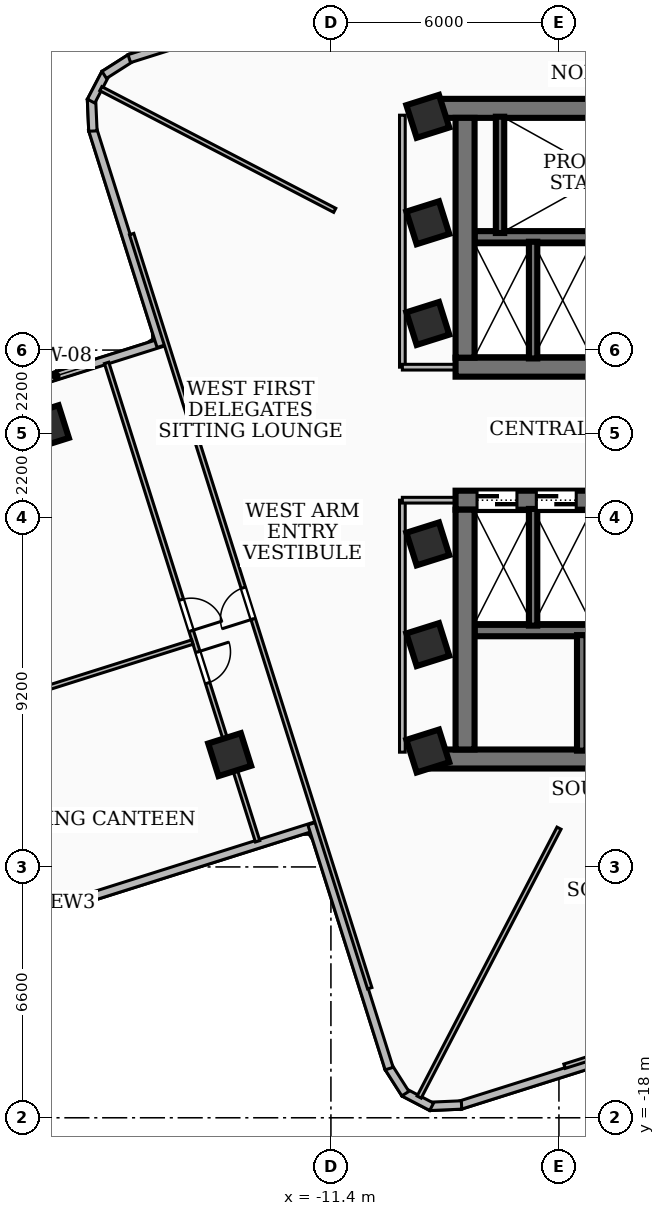
"""IFC4 building model, lengths in metres.
Left out: names, types, materials, properties, quantities, classifications, styles, units other than length and angle.
Written with IfcOpenShell. Run it as: python <this file> out.ifc"""

import sys

from ifc_helpers import new_model, si_unit, direction, frame, frame_2d, origin, origin_2d, place, context, subcontext, project, spatial, rectangle, extrude, element, fill, save


model = new_model("IFC4")
c1 = context("Model", 3, precision=1e-05, world=origin(), true_north=direction((0.0, 1.0)))
c2 = subcontext(c1, "Body", "Model", "MODEL_VIEW")
j1 = project(units=[si_unit("LENGTHUNIT", "METRE"), si_unit("PLANEANGLEUNIT", "RADIAN")], contexts=[c1])
p1 = place(None, origin())
s1 = spatial("IfcSite", under=j1, at=p1, CompositionType="ELEMENT")
p2 = place(p1, origin())
s2 = spatial("IfcBuilding", under=s1, at=p2, CompositionType="ELEMENT")
p3 = place(p2, frame((0.0, 0.0, 152.28)))
s3 = spatial("IfcBuildingStorey", under=s2, at=p3, CompositionType="ELEMENT", Elevation=152.28)
p4 = place(p3, frame((-8.78, 8.56, 0.0), z_axis=(0.0, 0.0, 1.0), x_axis=(1.0, 0.0, 0.0)))
e1 = element("IfcWall", 1, at=p4, inside=s3, PredefinedType="SHEAR", context=c2, shape_type="SweptSolid", body=[
    extrude(rectangle(XDim=17.56, YDim=0.5, at=frame_2d((8.78, 0.0))), origin(), (0.0, 0.0, 1.0), 3.34),
])
p5 = place(p3, frame((8.12, 1.75, 0.0), z_axis=(0.0, 0.0, 1.0), x_axis=(-1.0, 0.0, 0.0)))
e2 = element("IfcWall", 2, at=p5, inside=s3, PredefinedType="SHEAR", context=c2, shape_type="SweptSolid", body=[
    extrude(rectangle(XDim=16.24, YDim=0.5, at=frame_2d((8.12, 0.0))), origin(), (0.0, 0.0, 1.0), 3.34),
])
p6 = place(p5, frame((7.45, 0.0, 0.0)))
e3 = element("IfcOpeningElement", 3, at=p6, cuts=e2, PredefinedType="OPENING", context=c2, shape_type="SweptSolid", body=[
    extrude(rectangle(XDim=1.0, YDim=2.1, at=frame_2d((0.5, 1.05))), frame((0.0, 0.26, 0.0), z_axis=(0.0, -1.0, 0.0), x_axis=(1.0, 0.0, 0.0)), (0.0, 0.0, 1.0), 0.52),
])
p7 = place(p5, frame((3.85, 0.0, 0.0)))
e4 = element("IfcOpeningElement", 4, at=p7, cuts=e2, PredefinedType="OPENING", context=c2, shape_type="SweptSolid", body=[
    extrude(rectangle(XDim=0.9, YDim=2.06, at=frame_2d((0.45, 1.03))), frame((0.0, 0.26, 0.0), z_axis=(0.0, -1.0, 0.0), x_axis=(1.0, 0.0, 0.0)), (0.0, 0.0, 1.0), 0.52),
])
p8 = place(p5, frame((2.35, 0.0, 0.0)))
e5 = element("IfcOpeningElement", 5, at=p8, cuts=e2, PredefinedType="OPENING", context=c2, shape_type="SweptSolid", body=[
    extrude(rectangle(XDim=0.9, YDim=2.06, at=frame_2d((0.45, 1.03))), frame((0.0, 0.26, 0.0), z_axis=(0.0, -1.0, 0.0), x_axis=(1.0, 0.0, 0.0)), (0.0, 0.0, 1.0), 0.52),
])
p9 = place(p5, frame((0.8, 0.0, 0.0)))
e6 = element("IfcOpeningElement", 6, at=p9, cuts=e2, PredefinedType="OPENING", context=c2, shape_type="SweptSolid", body=[
    extrude(rectangle(XDim=0.9, YDim=2.06, at=frame_2d((0.45, 1.03))), frame((0.0, 0.26, 0.0), z_axis=(0.0, -1.0, 0.0), x_axis=(1.0, 0.0, 0.0)), (0.0, 0.0, 1.0), 0.52),
])
p10 = place(p3, frame((-7.87, 2.0, 0.0), z_axis=(0.0, 0.0, 1.0), x_axis=(0.0, 1.0, 0.0)))
e7 = element("IfcWall", 7, at=p10, inside=s3, PredefinedType="SHEAR", context=c2, shape_type="SweptSolid", body=[
    extrude(rectangle(XDim=6.31, YDim=0.5, at=frame_2d((3.155, 0.0))), origin(), (0.0, 0.0, 1.0), 3.34),
])
p11 = place(p3, frame((7.62, 5.18, 0.0), z_axis=(0.0, 0.0, 1.0), x_axis=(-1.0, 0.0, 0.0)))
e8 = element("IfcWall", 8, at=p11, inside=s3, PredefinedType="SOLIDWALL", context=c2, shape_type="SweptSolid", body=[
    extrude(rectangle(XDim=15.24, YDim=0.3, at=frame_2d((7.62, 0.0))), origin(), (0.0, 0.0, 1.0), 3.34),
])
p12 = place(p11, frame((5.77, 0.0, 0.0)))
e9 = element("IfcOpeningElement", 9, at=p12, cuts=e8, PredefinedType="OPENING", context=c2, shape_type="SweptSolid", body=[
    extrude(rectangle(XDim=1.1, YDim=2.15, at=frame_2d((0.55, 1.075))), frame((0.0, 0.16, 0.0), z_axis=(0.0, -1.0, 0.0), x_axis=(1.0, 0.0, 0.0)), (0.0, 0.0, 1.0), 0.32),
])
p13 = place(p11, frame((2.97, 0.0, 0.0)))
e10 = element("IfcOpeningElement", 10, at=p13, cuts=e8, PredefinedType="OPENING", context=c2, shape_type="SweptSolid", body=[
    extrude(rectangle(XDim=1.1, YDim=2.15, at=frame_2d((0.55, 1.075))), frame((0.0, 0.16, 0.0), z_axis=(0.0, -1.0, 0.0), x_axis=(1.0, 0.0, 0.0)), (0.0, 0.0, 1.0), 0.32),
])
p14 = place(p11, frame((7.97, 0.0, 0.0)))
e11 = element("IfcOpeningElement", 11, at=p14, cuts=e8, PredefinedType="OPENING", context=c2, shape_type="SweptSolid", body=[
    extrude(rectangle(XDim=1.0, YDim=2.1, at=frame_2d((0.5, 1.05))), frame((0.0, 0.16, 0.0), z_axis=(0.0, -1.0, 0.0), x_axis=(1.0, 0.0, 0.0)), (0.0, 0.0, 1.0), 0.32),
])
p15 = place(p3, frame((8.78, -8.56, 0.0), z_axis=(0.0, 0.0, 1.0), x_axis=(-1.0, 0.0, 0.0)))
e12 = element("IfcWall", 12, at=p15, inside=s3, PredefinedType="SHEAR", context=c2, shape_type="SweptSolid", body=[
    extrude(rectangle(XDim=17.56, YDim=0.5, at=frame_2d((8.78, 0.0))), origin(), (0.0, 0.0, 1.0), 3.34),
])
p16 = place(p3, frame((-8.12, -1.75, 0.0), z_axis=(0.0, 0.0, 1.0), x_axis=(1.0, 0.0, 0.0)))
e13 = element("IfcWall", 13, at=p16, inside=s3, PredefinedType="SHEAR", context=c2, shape_type="SweptSolid", body=[
    extrude(rectangle(XDim=16.24, YDim=0.5, at=frame_2d((8.12, 0.0))), origin(), (0.0, 0.0, 1.0), 3.34),
])
p17 = place(p16, frame((7.45, 0.0, 0.0)))
e14 = element("IfcOpeningElement", 14, at=p17, cuts=e13, PredefinedType="OPENING", context=c2, shape_type="SweptSolid", body=[
    extrude(rectangle(XDim=1.0, YDim=2.1, at=frame_2d((0.5, 1.05))), frame((0.0, 0.26, 0.0), z_axis=(0.0, -1.0, 0.0), x_axis=(1.0, 0.0, 0.0)), (0.0, 0.0, 1.0), 0.52),
])
p18 = place(p16, frame((12.65, 0.0, 0.0)))
e15 = element("IfcOpeningElement", 15, at=p18, cuts=e13, PredefinedType="OPENING", context=c2, shape_type="SweptSolid", body=[
    extrude(rectangle(XDim=0.9, YDim=2.06, at=frame_2d((0.45, 1.03))), frame((0.0, 0.26, 0.0), z_axis=(0.0, -1.0, 0.0), x_axis=(1.0, 0.0, 0.0)), (0.0, 0.0, 1.0), 0.52),
])
p19 = place(p16, frame((0.565, 0.0, 0.0)))
e16 = element("IfcOpeningElement", 16, at=p19, cuts=e13, PredefinedType="OPENING", context=c2, shape_type="SweptSolid", body=[
    extrude(rectangle(XDim=1.05, YDim=2.15, at=frame_2d((0.525, 1.075))), frame((0.0, 0.26, 0.0), z_axis=(0.0, -1.0, 0.0), x_axis=(1.0, 0.0, 0.0)), (0.0, 0.0, 1.0), 0.52),
])
p20 = place(p16, frame((2.125, 0.0, 0.0)))
e17 = element("IfcOpeningElement", 17, at=p20, cuts=e13, PredefinedType="OPENING", context=c2, shape_type="SweptSolid", body=[
    extrude(rectangle(XDim=1.05, YDim=2.15, at=frame_2d((0.525, 1.075))), frame((0.0, 0.26, 0.0), z_axis=(0.0, -1.0, 0.0), x_axis=(1.0, 0.0, 0.0)), (0.0, 0.0, 1.0), 0.52),
])
p21 = place(p16, frame((3.685, 0.0, 0.0)))
e18 = element("IfcOpeningElement", 18, at=p21, cuts=e13, PredefinedType="OPENING", context=c2, shape_type="SweptSolid", body=[
    extrude(rectangle(XDim=1.05, YDim=2.15, at=frame_2d((0.525, 1.075))), frame((0.0, 0.26, 0.0), z_axis=(0.0, -1.0, 0.0), x_axis=(1.0, 0.0, 0.0)), (0.0, 0.0, 1.0), 0.52),
])
p22 = place(p3, frame((-7.87, -8.31, 0.0), z_axis=(0.0, 0.0, 1.0), x_axis=(0.0, 1.0, 0.0)))
e19 = element("IfcWall", 19, at=p22, inside=s3, PredefinedType="SHEAR", context=c2, shape_type="SweptSolid", body=[
    extrude(rectangle(XDim=6.31, YDim=0.5, at=frame_2d((3.155, 0.0))), origin(), (0.0, 0.0, 1.0), 3.34),
])
p23 = place(p3, frame((-7.62, -5.18, 0.0), z_axis=(0.0, 0.0, 1.0), x_axis=(1.0, 0.0, 0.0)))
e20 = element("IfcWall", 20, at=p23, inside=s3, PredefinedType="SOLIDWALL", context=c2, shape_type="SweptSolid", body=[
    extrude(rectangle(XDim=15.24, YDim=0.3, at=frame_2d((7.62, 0.0))), origin(), (0.0, 0.0, 1.0), 3.34),
])
p24 = place(p23, frame((5.77, 0.0, 0.0)))
e21 = element("IfcOpeningElement", 21, at=p24, cuts=e20, PredefinedType="OPENING", context=c2, shape_type="SweptSolid", body=[
    extrude(rectangle(XDim=1.1, YDim=2.15, at=frame_2d((0.55, 1.075))), frame((0.0, 0.16, 0.0), z_axis=(0.0, -1.0, 0.0), x_axis=(1.0, 0.0, 0.0)), (0.0, 0.0, 1.0), 0.32),
])
p25 = place(p23, frame((7.97, 0.0, 0.0)))
e22 = element("IfcOpeningElement", 22, at=p25, cuts=e20, PredefinedType="OPENING", context=c2, shape_type="SweptSolid", body=[
    extrude(rectangle(XDim=1.0, YDim=2.1, at=frame_2d((0.5, 1.05))), frame((0.0, 0.16, 0.0), z_axis=(0.0, -1.0, 0.0), x_axis=(1.0, 0.0, 0.0)), (0.0, 0.0, 1.0), 0.32),
])
p26 = place(p3, frame((-6.95, 5.28, 0.0), z_axis=(0.0, 0.0, 1.0), x_axis=(0.0, 1.0, 0.0)))
e23 = element("IfcWall", 23, at=p26, inside=s3, PredefinedType="SOLIDWALL", context=c2, shape_type="SweptSolid", body=[
    extrude(rectangle(XDim=3.06, YDim=0.22, at=frame_2d((1.53, 0.0))), origin(), (0.0, 0.0, 1.0), 3.34),
])
p27 = place(p3, frame((-4.8, -8.34, 0.0), z_axis=(0.0, 0.0, 1.0), x_axis=(0.0, 1.0, 0.0)))
e24 = element("IfcWall", 24, at=p27, inside=s3, PredefinedType="SOLIDWALL", context=c2, shape_type="SweptSolid", body=[
    extrude(rectangle(XDim=3.04, YDim=0.25, at=frame_2d((1.52, 0.0))), origin(), (0.0, 0.0, 1.0), 3.34),
])
for number, where, z_axis, x_axis in (
    (25, (-6.08, 1.98, 0.0), (0.0, 0.0, 1.0), (0.0, 1.0, 0.0)),
    (26, (-6.08, -5.05, 0.0), (0.0, 0.0, 1.0), (0.0, 1.0, 0.0)),
):
    element("IfcWall", number, at=place(p3, frame(where, z_axis=z_axis, x_axis=x_axis)), inside=s3, PredefinedType="SOLIDWALL", context=c2, shape_type="SweptSolid", body=[
        extrude(rectangle(XDim=3.07, YDim=0.22, at=frame_2d((1.535, 0.0))), origin(), (0.0, 0.0, 1.0), 3.34),
    ])
for number, where, z_axis, x_axis in (
    (27, (-8.85, -5.55, 0.0), (0.0, 0.0, 1.0), (0.954, 0.301, 0.0)),
    (28, (-8.85, -2.9, 0.0), (0.0, 0.0, 1.0), (0.954, 0.301, 0.0)),
    (29, (-8.85, 2.9, 0.0), (0.0, 0.0, 1.0), (0.954, 0.301, 0.0)),
    (30, (-8.85, 5.55, 0.0), (0.0, 0.0, 1.0), (0.954, 0.301, 0.0)),
    (31, (-8.85, 8.35, 0.0), (0.0, 0.0, 1.0), (0.954, 0.301, 0.0)),
    (32, (-8.85, -8.35, 0.0), (0.0, 0.0, 1.0), (0.954, 0.301, 0.0)),
    (33, (-18.86, 0.183, 0.0), (0.0, 0.0, 1.0), (0.954, 0.301, 0.0)),
    (34, (-14.064, -8.445, 0.0), (0.0, 0.0, 1.0), (0.954, 0.301, 0.0)),
):
    element("IfcColumn", number, at=place(p3, frame(where, z_axis=z_axis, x_axis=x_axis)), inside=s3, PredefinedType="COLUMN", context=c2, shape_type="SweptSolid", body=[
        extrude(rectangle(XDim=0.9, YDim=0.9, at=origin_2d()), origin(), (0.0, 0.0, 1.0), 3.6),
    ])
p28 = place(p3, frame((-11.792, -10.319, 0.0), z_axis=(0.0, 0.0, 1.0), x_axis=(-0.953607060649, -0.301054104573, 0.0)))
e35 = element("IfcWall", 35, at=p28, inside=s3, PredefinedType="SOLIDWALL", context=c2, shape_type="SweptSolid", body=[
    extrude(rectangle(XDim=13.459, YDim=0.22, at=frame_2d((6.73, 0.0))), origin(), (0.0, 0.0, 1.0), 2.152),
])
p29 = place(p3, frame((-28.646, -1.64, 0.0), z_axis=(0.0, 0.0, 1.0), x_axis=(0.953626521982, 0.300992452685, 0.0)))
e36 = element("IfcWall", 36, at=p29, inside=s3, PredefinedType="SOLIDWALL", context=c2, shape_type="SweptSolid", body=[
    extrude(rectangle(XDim=13.458, YDim=0.22, at=frame_2d((6.729, 0.0))), origin(), (0.0, 0.0, 1.0), 3.34),
])
p30 = place(p29, frame((9.597, 0.0, 0.85)))
e37 = element("IfcOpeningElement", 37, at=p30, cuts=e36, PredefinedType="OPENING", context=c2, shape_type="SweptSolid", body=[
    extrude(rectangle(XDim=1.8, YDim=1.8, at=frame_2d((0.9, 0.9))), frame((0.0, 0.12, 0.0), z_axis=(0.0, -1.0, 0.0), x_axis=(1.0, 0.0, 0.0)), (0.0, 0.0, 1.0), 0.24),
])
p31 = place(p3, frame((-15.87, 2.301, 0.0), z_axis=(0.0, 0.0, 1.0), x_axis=(-0.300910882413, 0.953652264112, 0.0)))
e38 = element("IfcWall", 38, at=p31, inside=s3, PredefinedType="SOLIDWALL", context=c2, shape_type="SweptSolid", body=[
    extrude(rectangle(XDim=5.989, YDim=0.22, at=frame_2d((2.994, 0.0))), origin(), (0.0, 0.0, 1.0), 3.34),
])
p32 = place(p3, frame((-17.663, 7.963, 0.0), z_axis=(0.0, 0.0, 1.0), x_axis=(-0.044147725226, 0.99902501388, 0.0)))
e39 = element("IfcWall", 39, at=p32, inside=s3, PredefinedType="SOLIDWALL", context=c2, shape_type="SweptSolid", body=[
    extrude(rectangle(XDim=0.835, YDim=0.22, at=frame_2d((0.417, 0.0))), origin(), (0.0, 0.0, 1.0), 3.34),
])
p33 = place(p3, frame((-17.711, 8.75, 0.0), z_axis=(0.0, 0.0, 1.0), x_axis=(0.462647505427, 0.886542320322, 0.0)))
e40 = element("IfcWall", 40, at=p33, inside=s3, PredefinedType="SOLIDWALL", context=c2, shape_type="SweptSolid", body=[
    extrude(rectangle(XDim=0.819, YDim=0.22, at=frame_2d((0.41, 0.0))), origin(), (0.0, 0.0, 1.0), 3.34),
])
p34 = place(p3, frame((-17.365, 9.441, 0.0), z_axis=(0.0, 0.0, 1.0), x_axis=(0.84369762364, 0.536818702975, 0.0)))
e41 = element("IfcWall", 41, at=p34, inside=s3, PredefinedType="SOLIDWALL", context=c2, shape_type="SweptSolid", body=[
    extrude(rectangle(XDim=0.834, YDim=0.22, at=frame_2d((0.417, 0.0))), origin(), (0.0, 0.0, 1.0), 3.34),
])
p35 = place(p3, frame((-16.706, 9.868, 0.0), z_axis=(0.0, 0.0, 1.0), x_axis=(0.953629605256, 0.300982683852, 0.0)))
e42 = element("IfcWall", 42, at=p35, inside=s3, PredefinedType="SOLIDWALL", context=c2, shape_type="SweptSolid", body=[
    extrude(rectangle(XDim=6.759, YDim=0.22, at=frame_2d((3.379, 0.0))), origin(), (0.0, 0.0, 1.0), 3.34),
])
p36 = place(p3, frame((-2.301, -15.87, 0.0), z_axis=(0.0, 0.0, 1.0), x_axis=(-0.953652264112, -0.300910882413, 0.0)))
e43 = element("IfcWall", 43, at=p36, inside=s3, PredefinedType="SOLIDWALL", context=c2, shape_type="SweptSolid", body=[
    extrude(rectangle(XDim=5.989, YDim=0.22, at=frame_2d((2.994, 0.0))), origin(), (0.0, 0.0, 1.0), 2.152),
])
p37 = place(p3, frame((-7.963, -17.663, 0.0), z_axis=(0.0, 0.0, 1.0), x_axis=(-0.99902501388, -0.044147725226, 0.0)))
e44 = element("IfcWall", 44, at=p37, inside=s3, PredefinedType="SOLIDWALL", context=c2, shape_type="SweptSolid", body=[
    extrude(rectangle(XDim=0.835, YDim=0.22, at=frame_2d((0.417, 0.0))), origin(), (0.0, 0.0, 1.0), 3.34),
])
p38 = place(p3, frame((-8.75, -17.711, 0.0), z_axis=(0.0, 0.0, 1.0), x_axis=(-0.886542320322, 0.462647505427, 0.0)))
e45 = element("IfcWall", 45, at=p38, inside=s3, PredefinedType="SOLIDWALL", context=c2, shape_type="SweptSolid", body=[
    extrude(rectangle(XDim=0.819, YDim=0.22, at=frame_2d((0.41, 0.0))), origin(), (0.0, 0.0, 1.0), 3.34),
])
p39 = place(p3, frame((-9.441, -17.365, 0.0), z_axis=(0.0, 0.0, 1.0), x_axis=(-0.536818702975, 0.84369762364, 0.0)))
e46 = element("IfcWall", 46, at=p39, inside=s3, PredefinedType="SOLIDWALL", context=c2, shape_type="SweptSolid", body=[
    extrude(rectangle(XDim=0.834, YDim=0.22, at=frame_2d((0.417, 0.0))), origin(), (0.0, 0.0, 1.0), 3.34),
])
p40 = place(p3, frame((-9.868, -16.706, 0.0), z_axis=(0.0, 0.0, 1.0), x_axis=(-0.300982683852, 0.953629605256, 0.0)))
e47 = element("IfcWall", 47, at=p40, inside=s3, PredefinedType="SOLIDWALL", context=c2, shape_type="SweptSolid", body=[
    extrude(rectangle(XDim=6.759, YDim=0.22, at=frame_2d((3.379, 0.0))), origin(), (0.0, 0.0, 1.0), 2.152),
])
p41 = place(p3, frame((-9.52, 1.75, 0.0), z_axis=(0.0, 0.0, 1.0), x_axis=(0.0, 1.0, 0.0)))
e48 = element("IfcWall", 48, at=p41, inside=s3, PredefinedType="PARTITIONING", context=c2, shape_type="SweptSolid", body=[
    extrude(rectangle(XDim=6.63, YDim=0.15, at=frame_2d((3.315, 0.0))), origin(), (0.0, 0.0, 1.0), 2.152),
])
p42 = place(p3, frame((-7.85, 1.75, 0.0), z_axis=(0.0, 0.0, 1.0), x_axis=(-1.0, 0.0, 0.0)))
e49 = element("IfcWall", 49, at=p42, inside=s3, PredefinedType="PARTITIONING", context=c2, shape_type="SweptSolid", body=[
    extrude(rectangle(XDim=1.67, YDim=0.15, at=frame_2d((0.835, 0.0))), origin(), (0.0, 0.0, 1.0), 2.57),
])
p43 = place(p3, frame((-9.52, -8.38, 0.0), z_axis=(0.0, 0.0, 1.0), x_axis=(0.0, 1.0, 0.0)))
e50 = element("IfcWall", 50, at=p43, inside=s3, PredefinedType="PARTITIONING", context=c2, shape_type="SweptSolid", body=[
    extrude(rectangle(XDim=6.63, YDim=0.15, at=frame_2d((3.315, 0.0))), origin(), (0.0, 0.0, 1.0), 2.152),
])
p44 = place(p3, frame((-7.85, -1.75, 0.0), z_axis=(0.0, 0.0, 1.0), x_axis=(-1.0, 0.0, 0.0)))
e51 = element("IfcWall", 51, at=p44, inside=s3, PredefinedType="PARTITIONING", context=c2, shape_type="SweptSolid", body=[
    extrude(rectangle(XDim=1.67, YDim=0.15, at=frame_2d((0.835, 0.0))), origin(), (0.0, 0.0, 1.0), 2.57),
])
p45 = place(p3, frame((-11.3, 5.877, 0.0), z_axis=(0.0, 0.0, 1.0), x_axis=(-0.887198362964, 0.461388193123, 0.0)))
e52 = element("IfcWall", 52, at=p45, inside=s3, PredefinedType="PARTITIONING", context=c2, shape_type="SweptSolid", body=[
    extrude(rectangle(XDim=6.938, YDim=0.12, at=frame_2d((3.469, 0.0))), origin(), (0.0, 0.0, 1.0), 3.34),
])
p46 = place(p3, frame((-5.398, -10.38, 0.0), z_axis=(0.0, 0.0, 1.0), x_axis=(-0.461434665806, -0.887174193263, 0.0)))
e53 = element("IfcWall", 53, at=p46, inside=s3, PredefinedType="PARTITIONING", context=c2, shape_type="SweptSolid", body=[
    extrude(rectangle(XDim=7.975, YDim=0.12, at=frame_2d((3.988, 0.0))), origin(), (0.0, 0.0, 1.0), 2.152),
])
p47 = place(p3, frame((-10.379, -14.591, 0.0), z_axis=(0.0, 0.0, 1.0), x_axis=(-0.301070726534, 0.95360181293, 0.0)))
e54 = element("IfcWall", 54, at=p47, inside=s3, PredefinedType="PARTITIONING", context=c2, shape_type="SweptSolid", body=[
    extrude(rectangle(XDim=20.81, YDim=0.12, at=frame_2d((10.405, 0.0))), origin(), (0.0, 0.0, 1.0), 2.152),
])
p48 = place(p47, frame((10.189, 0.0, 0.0)))
e55 = element("IfcOpeningElement", 55, at=p48, cuts=e54, PredefinedType="OPENING", context=c2, shape_type="SweptSolid", body=[
    extrude(rectangle(XDim=0.86, YDim=2.0, at=frame_2d((0.43, 1.0))), frame((0.0, 0.07, 0.0), z_axis=(0.0, -1.0, 0.0), x_axis=(1.0, 0.0, 0.0)), (0.0, 0.0, 1.0), 0.14),
])
p49 = place(p3, frame((-15.047, -5.484, 0.0), z_axis=(0.0, 0.0, 1.0), x_axis=(-0.95359383289, -0.301096001093, 0.0)))
e56 = element("IfcWall", 56, at=p49, inside=s3, PredefinedType="PARTITIONING", context=c2, shape_type="SweptSolid", body=[
    extrude(rectangle(XDim=13.215, YDim=0.12, at=frame_2d((6.607, 0.0))), origin(), (0.0, 0.0, 1.0), 2.152),
])
p50 = place(p3, frame((-17.303, 1.863, 0.0), z_axis=(0.0, 0.0, 1.0), x_axis=(0.300972919735, -0.953632686933, 0.0)))
e57 = element("IfcWall", 57, at=p50, inside=s3, PredefinedType="PARTITIONING", context=c2, shape_type="SweptSolid", body=[
    extrude(rectangle(XDim=13.2, YDim=0.12, at=frame_2d((6.6, 0.0))), origin(), (0.0, 0.0, 1.0), 2.152),
])
p51 = place(p50, frame((6.534, 0.0, 0.0)))
e58 = element("IfcOpeningElement", 58, at=p51, cuts=e57, PredefinedType="OPENING", context=c2, shape_type="SweptSolid", body=[
    extrude(rectangle(XDim=0.86, YDim=2.04, at=frame_2d((0.43, 1.02))), frame((0.0, 0.07, 0.0), z_axis=(0.0, -1.0, 0.0), x_axis=(1.0, 0.0, 0.0)), (0.0, 0.0, 1.0), 0.14),
])
p52 = place(p50, frame((7.975, 0.0, 0.0)))
e59 = element("IfcOpeningElement", 59, at=p52, cuts=e57, PredefinedType="OPENING", context=c2, shape_type="SweptSolid", body=[
    extrude(rectangle(XDim=0.86, YDim=2.04, at=frame_2d((0.43, 1.02))), frame((0.0, 0.07, 0.0), z_axis=(0.0, -1.0, 0.0), x_axis=(1.0, 0.0, 0.0)), (0.0, 0.0, 1.0), 0.14),
])
p53 = place(p3, frame((14.591, -10.379, 0.0), z_axis=(0.0, 0.0, 1.0), x_axis=(-0.95360181293, -0.301070726534, 0.0)))
e60 = element("IfcWall", 60, at=p53, inside=s3, PredefinedType="PARTITIONING", context=c2, shape_type="SweptSolid", body=[
    extrude(rectangle(XDim=20.81, YDim=0.12, at=frame_2d((10.405, 0.0))), origin(), (0.0, 0.0, 1.0), 2.152),
])
p54 = place(p53, frame((10.189, 0.0, 0.0)))
e61 = element("IfcOpeningElement", 61, at=p54, cuts=e60, PredefinedType="OPENING", context=c2, shape_type="SweptSolid", body=[
    extrude(rectangle(XDim=0.86, YDim=2.0, at=frame_2d((0.43, 1.0))), frame((0.0, 0.07, 0.0), z_axis=(0.0, -1.0, 0.0), x_axis=(1.0, 0.0, 0.0)), (0.0, 0.0, 1.0), 0.14),
])
p55 = place(p30, origin())
e62 = element("IfcWindow", 62, at=p55, inside=s3, PartitioningType="SINGLE_PANEL", PredefinedType="WINDOW", context=c2, shape_type="SweptSolid", body=[
    extrude(rectangle(XDim=1.8, YDim=1.8, at=frame_2d((0.9, 0.9))), frame((0.0, 0.03, 0.0), z_axis=(0.0, -1.0, 0.0), x_axis=(1.0, 0.0, 0.0)), (0.0, 0.0, 1.0), 0.06),
])
fill(e37, e62)
p56 = place(p19, origin())
e63 = element("IfcDoor", 63, at=p56, inside=s3, OperationType="DOUBLE_DOOR_SLIDING", PredefinedType="DOOR", context=c2, shape_type="SweptSolid", body=[
    extrude(rectangle(XDim=1.05, YDim=2.15, at=frame_2d((0.525, 1.075))), frame((0.0, 0.025, 0.0), z_axis=(0.0, -1.0, 0.0), x_axis=(1.0, 0.0, 0.0)), (0.0, 0.0, 1.0), 0.05),
])
fill(e16, e63)
p57 = place(p20, origin())
e64 = element("IfcDoor", 64, at=p57, inside=s3, OperationType="DOUBLE_DOOR_SLIDING", PredefinedType="DOOR", context=c2, shape_type="SweptSolid", body=[
    extrude(rectangle(XDim=1.05, YDim=2.15, at=frame_2d((0.525, 1.075))), frame((0.0, 0.025, 0.0), z_axis=(0.0, -1.0, 0.0), x_axis=(1.0, 0.0, 0.0)), (0.0, 0.0, 1.0), 0.05),
])
fill(e17, e64)
p58 = place(p48, origin())
e65 = element("IfcDoor", 65, at=p58, inside=s3, OperationType="SINGLE_SWING_LEFT", PredefinedType="DOOR", context=c2, shape_type="SweptSolid", body=[
    extrude(rectangle(XDim=0.86, YDim=2.0, at=frame_2d((0.43, 1.0))), frame((0.0, 0.025, 0.0), z_axis=(0.0, -1.0, 0.0), x_axis=(1.0, 0.0, 0.0)), (0.0, 0.0, 1.0), 0.05),
])
fill(e55, e65)
p59 = place(p51, origin())
e66 = element("IfcDoor", 66, at=p59, inside=s3, OperationType="SINGLE_SWING_RIGHT", PredefinedType="DOOR", context=c2, shape_type="SweptSolid", body=[
    extrude(rectangle(XDim=0.86, YDim=2.04, at=frame_2d((0.43, 1.02))), frame((0.0, 0.025, 0.0), z_axis=(0.0, -1.0, 0.0), x_axis=(1.0, 0.0, 0.0)), (0.0, 0.0, 1.0), 0.05),
])
fill(e58, e66)
p60 = place(p52, origin())
e67 = element("IfcDoor", 67, at=p60, inside=s3, OperationType="SINGLE_SWING_LEFT", PredefinedType="DOOR", context=c2, shape_type="SweptSolid", body=[
    extrude(rectangle(XDim=0.86, YDim=2.04, at=frame_2d((0.43, 1.02))), frame((0.0, 0.025, 0.0), z_axis=(0.0, -1.0, 0.0), x_axis=(1.0, 0.0, 0.0)), (0.0, 0.0, 1.0), 0.05),
])
fill(e59, e67)
save(model, sys.argv[1])
